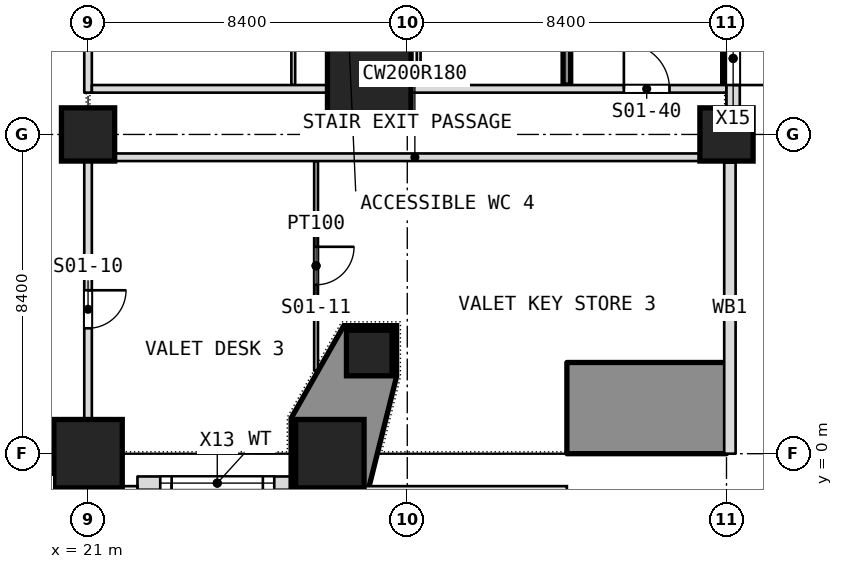
"""IFC4 building model, lengths in metres.
Left out: names, types, materials, properties, quantities, classifications, styles, units other than length and angle.
Written with IfcOpenShell. Run it as: python <this file> out.ifc"""

import sys

from ifc_helpers import new_model, si_unit, direction, frame, frame_2d, origin, origin_2d, place, context, subcontext, project, spatial, polyline, rectangle, outline, extrude, element, fill, save


model = new_model("IFC4")
c1 = context("Model", 3, precision=1e-05, world=origin(), true_north=direction((0.0, 1.0)))
c2 = subcontext(c1, "Body", "Model", "MODEL_VIEW")
j1 = project(units=[si_unit("LENGTHUNIT", "METRE"), si_unit("PLANEANGLEUNIT", "RADIAN")], contexts=[c1])
p1 = place(None, origin())
s1 = spatial("IfcSite", under=j1, at=p1, CompositionType="ELEMENT")
p2 = place(p1, origin())
s2 = spatial("IfcBuilding", under=s1, at=p2, CompositionType="ELEMENT")
p3 = place(p2, origin())
s3 = spatial("IfcBuildingStorey", under=s2, at=p3, CompositionType="ELEMENT", Elevation=0.0)
p4 = place(p3, frame((21.0, 0.0, -0.3), z_axis=(0.0, 0.0, 1.0), x_axis=(1.0, 0.0, 0.0)))
e1 = element("IfcColumn", 1, at=p4, inside=s3, PredefinedType="COLUMN", context=c2, shape_type="SweptSolid", body=[
    extrude(rectangle(XDim=1.8, YDim=1.8, at=origin_2d()), origin(), (0.0, 0.0, 1.0), 8.3),
])
for number, where, z_axis, x_axis in (
    (2, (21.0, 8.4, -0.3), (0.0, 0.0, 1.0), (1.0, 0.0, 0.0)),
    (3, (37.8, 8.4, -0.3), (0.0, 0.0, 1.0), (1.0, 0.0, 0.0)),
):
    element("IfcColumn", number, at=place(p3, frame(where, z_axis=z_axis, x_axis=x_axis)), inside=s3, PredefinedType="COLUMN", context=c2, shape_type="SweptSolid", body=[
        extrude(rectangle(XDim=1.4, YDim=1.4, at=origin_2d()), origin(), (0.0, 0.0, 1.0), 8.3),
    ])
p5 = place(p3, frame((27.363, 0.0, -0.3), z_axis=(0.0, 0.0, 1.0), x_axis=(1.0, 0.0, 0.0)))
e4 = element("IfcColumn", 4, at=p5, inside=s3, PredefinedType="COLUMN", context=c2, shape_type="SweptSolid", body=[
    extrude(rectangle(XDim=1.8, YDim=1.8, at=origin_2d()), origin(), (0.0, 0.0, 1.0), 8.3),
])
p6 = place(p3, frame((28.4, 10.05, -0.3), z_axis=(0.0, 0.0, 1.0), x_axis=(1.0, 0.0, 0.0)))
e5 = element("IfcColumn", 5, at=p6, inside=s3, PredefinedType="COLUMN", context=c2, shape_type="SweptSolid", body=[
    extrude(rectangle(XDim=2.2, YDim=2.2, at=origin_2d()), origin(), (0.0, 0.0, 1.0), 8.3),
])
p7 = place(p3, frame((33.6, 1.2, -0.3), z_axis=(0.0, 0.0, 1.0), x_axis=(1.0, 0.0, 0.0)))
e6 = element("IfcWall", 6, at=p7, inside=s3, PredefinedType="SOLIDWALL", context=c2, shape_type="SweptSolid", body=[
    extrude(rectangle(XDim=4.2, YDim=2.4, at=frame_2d((2.1, 0.0))), origin(), (0.0, 0.0, 1.0), 8.3),
])
p8 = place(p3, frame((28.4, 2.649, -0.3), z_axis=(0.0, 0.0, 1.0), x_axis=(1.0, 0.0, 0.0)))
e7 = element("IfcColumn", 7, at=p8, inside=s3, PredefinedType="COLUMN", context=c2, shape_type="SweptSolid", body=[
    extrude(rectangle(XDim=1.2, YDim=1.2, at=origin_2d()), origin(), (0.0, 0.0, 1.0), 8.3),
])
p9 = place(p3, frame((33.6, 9.7, 0.0), z_axis=(0.0, 0.0, 1.0), x_axis=(0.0, 1.0, 0.0)))
e8 = element("IfcWall", 8, at=p9, inside=s3, PredefinedType="PARTITIONING", context=c2, shape_type="SweptSolid", body=[
    extrude(rectangle(XDim=6.0, YDim=0.2, at=frame_2d((3.0, 0.0))), origin(), (0.0, 0.0, 1.0), 7.68),
])
p10 = place(p3, frame((29.7, 9.7, 0.0), z_axis=(0.0, 0.0, 1.0), x_axis=(0.0, 1.0, 0.0)))
e9 = element("IfcWall", 9, at=p10, inside=s3, PredefinedType="PARTITIONING", context=c2, shape_type="SweptSolid", body=[
    extrude(rectangle(XDim=6.23, YDim=0.1, at=frame_2d((3.115, 0.0))), origin(), (0.0, 0.0, 1.0), 7.68),
])
p11 = place(p10, frame((2.615, 0.0, 0.0)))
e10 = element("IfcOpeningElement", 10, at=p11, cuts=e9, PredefinedType="OPENING", context=c2, shape_type="SweptSolid", body=[
    extrude(rectangle(XDim=1.0, YDim=2.1, at=frame_2d((0.5, 1.05))), frame((0.0, 0.05, 0.0), z_axis=(0.0, -1.0, 0.0), x_axis=(1.0, 0.0, 0.0)), (0.0, 0.0, 1.0), 0.1),
])
p12 = place(p3, frame((27.0, 2.187, 0.0), z_axis=(0.0, 0.0, 1.0), x_axis=(0.0, 1.0, 0.0)))
e11 = element("IfcWall", 11, at=p12, inside=s3, PredefinedType="PARTITIONING", context=c2, shape_type="SweptSolid", body=[
    extrude(rectangle(XDim=5.513, YDim=0.1, at=frame_2d((2.756, 0.0))), origin(), (0.0, 0.0, 1.0), 7.68),
])
p13 = place(p12, frame((2.257, 0.0, 0.0)))
e12 = element("IfcOpeningElement", 12, at=p13, cuts=e11, PredefinedType="OPENING", context=c2, shape_type="SweptSolid", body=[
    extrude(rectangle(XDim=1.0, YDim=2.1, at=frame_2d((0.5, 1.05))), frame((0.0, 0.05, 0.0), z_axis=(0.0, -1.0, 0.0), x_axis=(1.0, 0.0, 0.0)), (0.0, 0.0, 1.0), 0.1),
])
p14 = place(p3, frame((26.4, 9.7, 0.0), z_axis=(0.0, 0.0, 1.0), x_axis=(0.0, 1.0, 0.0)))
e13 = element("IfcWall", 13, at=p14, inside=s3, PredefinedType="PARTITIONING", context=c2, shape_type="SweptSolid", body=[
    extrude(rectangle(XDim=7.2, YDim=0.1, at=frame_2d((3.6, 0.0))), origin(), (0.0, 0.0, 1.0), 7.68),
])
p15 = place(p14, frame((3.1, 0.0, 0.0)))
e14 = element("IfcOpeningElement", 14, at=p15, cuts=e13, PredefinedType="OPENING", context=c2, shape_type="SweptSolid", body=[
    extrude(rectangle(XDim=1.0, YDim=2.1, at=frame_2d((0.5, 1.05))), frame((0.0, 0.05, 0.0), z_axis=(0.0, -1.0, 0.0), x_axis=(1.0, 0.0, 0.0)), (0.0, 0.0, 1.0), 0.1),
])
p16 = place(p3, frame((21.0, -0.894, 0.0), z_axis=(0.0, 0.0, 1.0), x_axis=(0.0, 1.0, 0.0)))
e15 = element("IfcWall", 15, at=p16, inside=s3, PredefinedType="PARTITIONING", context=c2, shape_type="SweptSolid", body=[
    extrude(rectangle(XDim=8.794, YDim=0.2, at=frame_2d((4.397, 0.0))), origin(), (0.0, 0.0, 1.0), 7.68),
])
p17 = place(p16, frame((4.194, 0.0, 0.0)))
e16 = element("IfcOpeningElement", 16, at=p17, cuts=e15, PredefinedType="OPENING", context=c2, shape_type="SweptSolid", body=[
    extrude(rectangle(XDim=1.0, YDim=2.1, at=frame_2d((0.5, 1.05))), frame((0.0, 0.1, 0.0), z_axis=(0.0, -1.0, 0.0), x_axis=(1.0, 0.0, 0.0)), (0.0, 0.0, 1.0), 0.2),
])
p18 = place(p3, frame((21.0, 9.5, 0.0), z_axis=(0.0, 0.0, 1.0), x_axis=(0.0, 1.0, 0.0)))
e17 = element("IfcWall", 17, at=p18, inside=s3, PredefinedType="PARTITIONING", context=c2, shape_type="SweptSolid", body=[
    extrude(rectangle(XDim=22.135, YDim=0.2, at=frame_2d((11.067, 0.0))), origin(), (0.0, 0.0, 1.0), 7.68),
])
p19 = place(p18, frame((3.2, 0.0, 0.0)))
e18 = element("IfcOpeningElement", 18, at=p19, cuts=e17, PredefinedType="OPENING", context=c2, shape_type="SweptSolid", body=[
    extrude(rectangle(XDim=1.0, YDim=2.1, at=frame_2d((0.5, 1.05))), frame((0.0, 0.1, 0.0), z_axis=(0.0, -1.0, 0.0), x_axis=(1.0, 0.0, 0.0)), (0.0, 0.0, 1.0), 0.2),
])
p20 = place(p18, frame((9.467, 0.0, 0.0)))
e19 = element("IfcOpeningElement", 19, at=p20, cuts=e17, PredefinedType="OPENING", context=c2, shape_type="SweptSolid", body=[
    extrude(rectangle(XDim=1.8, YDim=2.1, at=frame_2d((0.9, 1.05))), frame((0.0, 0.1, 0.0), z_axis=(0.0, -1.0, 0.0), x_axis=(1.0, 0.0, 0.0)), (0.0, 0.0, 1.0), 0.2),
])
p21 = place(p3, frame((21.1, 7.8, 0.0), z_axis=(0.0, 0.0, 1.0), x_axis=(1.0, 0.0, 0.0)))
e20 = element("IfcWall", 20, at=p21, inside=s3, PredefinedType="PARTITIONING", context=c2, shape_type="SweptSolid", body=[
    extrude(rectangle(XDim=17.0, YDim=0.2, at=frame_2d((8.5, 0.0))), origin(), (0.0, 0.0, 1.0), 7.68),
])
p22 = place(p3, frame((21.1, 9.6, 0.0), z_axis=(0.0, 0.0, 1.0), x_axis=(1.0, 0.0, 0.0)))
e21 = element("IfcWall", 21, at=p22, inside=s3, PredefinedType="PARTITIONING", context=c2, shape_type="SweptSolid", body=[
    extrude(rectangle(XDim=16.7, YDim=0.2, at=frame_2d((8.35, 0.0))), origin(), (0.0, 0.0, 1.0), 7.68),
])
p23 = place(p22, frame((14.0, 0.0, 0.0)))
e22 = element("IfcOpeningElement", 22, at=p23, cuts=e21, PredefinedType="OPENING", context=c2, shape_type="SweptSolid", body=[
    extrude(rectangle(XDim=1.2, YDim=2.1, at=frame_2d((0.6, 1.05))), frame((0.0, 0.1, 0.0), z_axis=(0.0, -1.0, 0.0), x_axis=(1.0, 0.0, 0.0)), (0.0, 0.0, 1.0), 0.2),
])
p24 = place(p3, frame((22.3, -0.774, 0.0), z_axis=(0.0, 0.0, 1.0), x_axis=(1.0, 0.0, 0.0)))
e23 = element("IfcWall", 23, at=p24, inside=s3, PredefinedType="NOTDEFINED", context=c2, shape_type="SweptSolid", body=[
    extrude(rectangle(XDim=4.2, YDim=0.35, at=frame_2d((2.1, 0.0))), origin(), (0.0, 0.0, 1.0), 8.0),
])
p25 = place(p24, frame((0.9, 0.0, 0.0)))
e24 = element("IfcOpeningElement", 24, at=p25, cuts=e23, PredefinedType="OPENING", context=c2, shape_type="SweptSolid", body=[
    extrude(rectangle(XDim=2.4, YDim=2.4, at=frame_2d((1.2, 1.2))), frame((0.0, 0.175, 0.0), z_axis=(0.0, -1.0, 0.0), x_axis=(1.0, 0.0, 0.0)), (0.0, 0.0, 1.0), 0.35),
])
p26 = place(p24, frame((0.6, 0.0, 2.9)))
e25 = element("IfcOpeningElement", 25, at=p26, cuts=e23, PredefinedType="OPENING", context=c2, shape_type="SweptSolid", body=[
    extrude(rectangle(XDim=3.0, YDim=2.6, at=frame_2d((1.5, 1.3))), frame((0.0, 0.175, 0.0), z_axis=(0.0, -1.0, 0.0), x_axis=(1.0, 0.0, 0.0)), (0.0, 0.0, 1.0), 0.35),
])
p27 = place(p3, frame((37.975, 9.1, 0.0), z_axis=(0.0, 0.0, 1.0), x_axis=(0.0, 1.0, 0.0)))
e26 = element("IfcWall", 26, at=p27, inside=s3, PredefinedType="NOTDEFINED", context=c2, shape_type="SweptSolid", body=[
    extrude(rectangle(XDim=2.6, YDim=0.35, at=frame_2d((1.3, 0.0))), origin(), (0.0, 0.0, 1.0), 8.0),
])
p28 = place(p27, frame((0.6, 0.0, 0.0)))
e27 = element("IfcOpeningElement", 27, at=p28, cuts=e26, PredefinedType="OPENING", context=c2, shape_type="SweptSolid", body=[
    extrude(rectangle(XDim=1.4, YDim=2.2, at=frame_2d((0.7, 1.1))), frame((0.0, 0.175, 0.0), z_axis=(0.0, -1.0, 0.0), x_axis=(1.0, 0.0, 0.0)), (0.0, 0.0, 1.0), 0.35),
])
p29 = place(p3, frame((37.89, 0.0, 0.0), z_axis=(0.0, 0.0, 1.0), x_axis=(0.0, 1.0, 0.0)))
e28 = element("IfcWall", 28, at=p29, inside=s3, PredefinedType="NOTDEFINED", context=c2, shape_type="SweptSolid", body=[
    extrude(rectangle(XDim=7.66, YDim=0.3, at=frame_2d((3.83, 0.0))), origin(), (0.0, 0.0, 1.0), 6.78),
])
p30 = place(p3, origin())
e29 = element("IfcWall", 29, at=p30, inside=s3, PredefinedType="SOLIDWALL", context=c2, shape_type="SweptSolid", body=[
    extrude(outline(polyline([(27.73, 3.369), (29.12, 3.369), (29.12, 2.034), (28.357, -1.02), (26.343, -1.02), (26.343, 0.932), (27.73, 3.369)]), holes=[polyline([(29.0, 2.049), (29.0, 3.249), (27.8, 3.249), (27.8, 2.049), (29.0, 2.049)]), polyline([(28.263, -0.9), (28.263, 0.9), (26.463, 0.9), (26.463, -0.9), (28.263, -0.9)])]), origin(), (0.0, 0.0, 1.0), 8.0),
])
p31 = place(p13, origin())
e30 = element("IfcDoor", 30, at=p31, inside=s3, OperationType="SINGLE_SWING_RIGHT", PredefinedType="DOOR", context=c2, shape_type="SweptSolid", body=[
    extrude(rectangle(XDim=1.0, YDim=2.1, at=frame_2d((0.5, 1.05))), frame((0.0, 0.025, 0.0), z_axis=(0.0, -1.0, 0.0), x_axis=(1.0, 0.0, 0.0)), (0.0, 0.0, 1.0), 0.05),
])
fill(e12, e30)
p32 = place(p17, origin())
e31 = element("IfcDoor", 31, at=p32, inside=s3, OperationType="SINGLE_SWING_LEFT", PredefinedType="DOOR", context=c2, shape_type="SweptSolid", body=[
    extrude(rectangle(XDim=1.0, YDim=2.1, at=frame_2d((0.5, 1.05))), frame((0.0, 0.025, 0.0), z_axis=(0.0, -1.0, 0.0), x_axis=(1.0, 0.0, 0.0)), (0.0, 0.0, 1.0), 0.05),
])
fill(e16, e31)
p33 = place(p23, origin())
e32 = element("IfcDoor", 32, at=p33, inside=s3, OperationType="SINGLE_SWING_LEFT", PredefinedType="DOOR", context=c2, shape_type="SweptSolid", body=[
    extrude(rectangle(XDim=1.2, YDim=2.1, at=frame_2d((0.6, 1.05))), frame((0.0, 0.025, 0.0), z_axis=(0.0, -1.0, 0.0), x_axis=(1.0, 0.0, 0.0)), (0.0, 0.0, 1.0), 0.05),
])
fill(e22, e32)
p34 = place(p25, frame((2.4, 0.0, 0.0), z_axis=(0.0, 0.0, 1.0), x_axis=(-1.0, 0.0, 0.0)))
e33 = element("IfcDoor", 33, at=p34, inside=s3, OperationType="DOUBLE_DOOR_DOUBLE_SWING", PredefinedType="DOOR", context=c2, shape_type="SweptSolid", body=[
    extrude(rectangle(XDim=2.4, YDim=2.4, at=frame_2d((1.2, 1.2))), frame((0.0, 0.025, 0.0), z_axis=(0.0, -1.0, 0.0), x_axis=(1.0, 0.0, 0.0)), (0.0, 0.0, 1.0), 0.05),
])
fill(e24, e33)
p35 = place(p26, origin())
e34 = element("IfcWindow", 34, at=p35, inside=s3, PartitioningType="SINGLE_PANEL", PredefinedType="WINDOW", context=c2, shape_type="SweptSolid", body=[
    extrude(rectangle(XDim=3.0, YDim=2.6, at=frame_2d((1.5, 1.3))), frame((0.0, 0.03, 0.0), z_axis=(0.0, -1.0, 0.0), x_axis=(1.0, 0.0, 0.0)), (0.0, 0.0, 1.0), 0.06),
])
fill(e25, e34)
p36 = place(p28, frame((1.4, 0.0, 0.0), z_axis=(0.0, 0.0, 1.0), x_axis=(-1.0, 0.0, 0.0)))
e35 = element("IfcDoor", 35, at=p36, inside=s3, OperationType="SINGLE_SWING_LEFT", PredefinedType="DOOR", context=c2, shape_type="SweptSolid", body=[
    extrude(rectangle(XDim=1.4, YDim=2.2, at=frame_2d((0.7, 1.1))), frame((0.0, 0.025, 0.0), z_axis=(0.0, -1.0, 0.0), x_axis=(1.0, 0.0, 0.0)), (0.0, 0.0, 1.0), 0.05),
])
fill(e27, e35)
save(model, sys.argv[1])
